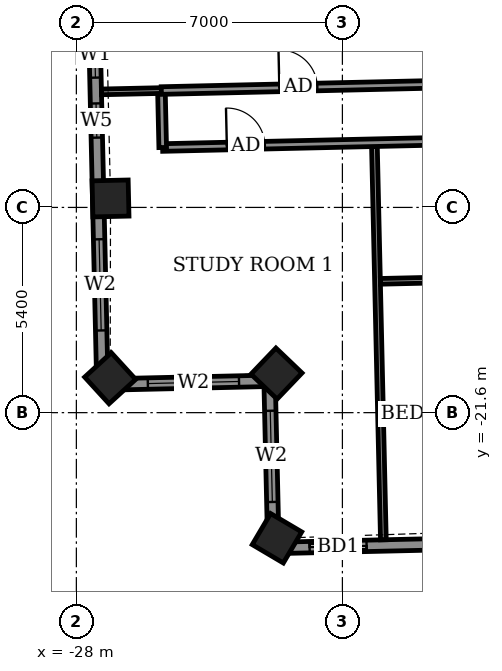
"""IFC4 building model, lengths in metres.
Left out: names, types, materials, properties, quantities, classifications, styles, units other than length and angle.
Written with IfcOpenShell. Run it as: python <this file> out.ifc"""

import sys

from ifc_helpers import new_model, si_unit, direction, frame, frame_2d, origin, origin_2d, place, context, subcontext, project, spatial, rectangle, extrude, element, fill, save


model = new_model("IFC4")
c1 = context("Model", 3, precision=1e-05, world=origin(), true_north=direction((0.0, 1.0)))
c2 = subcontext(c1, "Body", "Model", "MODEL_VIEW")
j1 = project(units=[si_unit("LENGTHUNIT", "METRE"), si_unit("PLANEANGLEUNIT", "RADIAN")], contexts=[c1])
p1 = place(None, origin())
s1 = spatial("IfcSite", under=j1, at=p1, CompositionType="ELEMENT")
p2 = place(p1, origin())
s2 = spatial("IfcBuilding", under=s1, at=p2, CompositionType="ELEMENT")
p3 = place(p2, frame((0.0, 0.0, 290.7)))
s3 = spatial("IfcBuildingStorey", under=s2, at=p3, CompositionType="ELEMENT", Elevation=290.7)
for number, where, z_axis, x_axis in (
    (1, (-27.101, -15.964, -0.55), (0.0, 0.0, 1.0), (0.023, -1.0, 0.0)),
    (2, (-27.11, -20.695, -0.55), (0.0, 0.0, 1.0), (0.675, -0.738, 0.0)),
    (3, (-22.734, -20.572, -0.55), (0.0, 0.0, 1.0), (0.723, -0.691, 0.0)),
    (4, (-22.721, -24.905, -0.55), (0.0, 0.0, 1.0), (0.861, -0.509, 0.0)),
):
    element("IfcColumn", number, at=place(p3, frame(where, z_axis=z_axis, x_axis=x_axis)), inside=s3, PredefinedType="COLUMN", context=c2, shape_type="SweptSolid", body=[
        extrude(rectangle(XDim=0.95, YDim=0.95, at=origin_2d()), origin(), (0.0, 0.0, 1.0), 3.6),
    ])
p4 = place(p3, frame((-27.665, -5.416, 0.0), z_axis=(0.0, 0.0, 1.0), x_axis=(0.022660024814, -0.999743228672, 0.0)))
e5 = element("IfcWall", 5, at=p4, inside=s3, PredefinedType="SOLIDWALL", context=c2, shape_type="SweptSolid", body=[
    extrude(rectangle(XDim=15.45, YDim=0.3, at=frame_2d((7.725, 0.0))), origin(), (0.0, 0.0, 1.0), 2.55),
])
p5 = place(p4, frame((1.975, 0.0, 0.0)))
e6 = element("IfcOpeningElement", 6, at=p5, cuts=e5, PredefinedType="OPENING", context=c2, shape_type="SweptSolid", body=[
    extrude(rectangle(XDim=1.5, YDim=2.4, at=frame_2d((0.75, 1.2))), frame((0.0, 0.16, 0.0), z_axis=(0.0, -1.0, 0.0), x_axis=(1.0, 0.0, 0.0)), (0.0, 0.0, 1.0), 0.32),
])
p6 = place(p4, frame((6.171, 0.0, 0.9)))
e7 = element("IfcOpeningElement", 7, at=p6, cuts=e5, PredefinedType="OPENING", context=c2, shape_type="SweptSolid", body=[
    extrude(rectangle(XDim=1.2, YDim=1.5, at=frame_2d((0.6, 0.75))), frame((0.0, 0.16, 0.0), z_axis=(0.0, -1.0, 0.0), x_axis=(1.0, 0.0, 0.0)), (0.0, 0.0, 1.0), 0.32),
])
p7 = place(p4, frame((8.05, 0.0, 0.9)))
e8 = element("IfcOpeningElement", 8, at=p7, cuts=e5, PredefinedType="OPENING", context=c2, shape_type="SweptSolid", body=[
    extrude(rectangle(XDim=0.9, YDim=1.5, at=frame_2d((0.45, 0.75))), frame((0.0, 0.16, 0.0), z_axis=(0.0, -1.0, 0.0), x_axis=(1.0, 0.0, 0.0)), (0.0, 0.0, 1.0), 0.32),
])
p8 = place(p4, frame((11.625, 0.0, 0.9)))
e9 = element("IfcOpeningElement", 9, at=p8, cuts=e5, PredefinedType="OPENING", context=c2, shape_type="SweptSolid", body=[
    extrude(rectangle(XDim=2.4, YDim=1.5, at=frame_2d((1.2, 0.75))), frame((0.0, 0.16, 0.0), z_axis=(0.0, -1.0, 0.0), x_axis=(1.0, 0.0, 0.0)), (0.0, 0.0, 1.0), 0.32),
])
p9 = place(p3, frame((-27.315, -20.862, 0.0), z_axis=(0.0, 0.0, 1.0), x_axis=(0.999741204967, 0.022749133868, 0.0)))
e10 = element("IfcWall", 10, at=p9, inside=s3, PredefinedType="SOLIDWALL", context=c2, shape_type="SweptSolid", body=[
    extrude(rectangle(XDim=4.4, YDim=0.3, at=frame_2d((2.2, 0.0))), origin(), (0.0, 0.0, 1.0), 2.55),
])
p10 = place(p9, frame((1.196, 0.0, 0.9)))
e11 = element("IfcOpeningElement", 11, at=p10, cuts=e10, PredefinedType="OPENING", context=c2, shape_type="SweptSolid", body=[
    extrude(rectangle(XDim=2.4, YDim=1.5, at=frame_2d((1.2, 0.75))), frame((0.0, 0.16, 0.0), z_axis=(0.0, -1.0, 0.0), x_axis=(1.0, 0.0, 0.0)), (0.0, 0.0, 1.0), 0.32),
])
p11 = place(p3, frame((-22.916, -20.762, 0.0), z_axis=(0.0, 0.0, 1.0), x_axis=(0.022749133868, -0.999741204967, 0.0)))
e12 = element("IfcWall", 12, at=p11, inside=s3, PredefinedType="SOLIDWALL", context=c2, shape_type="SweptSolid", body=[
    extrude(rectangle(XDim=4.4, YDim=0.3, at=frame_2d((2.2, 0.0))), origin(), (0.0, 0.0, 1.0), 2.55),
])
p12 = place(p11, frame((0.789, 0.0, 0.9)))
e13 = element("IfcOpeningElement", 13, at=p12, cuts=e12, PredefinedType="OPENING", context=c2, shape_type="SweptSolid", body=[
    extrude(rectangle(XDim=2.4, YDim=1.5, at=frame_2d((1.2, 0.75))), frame((0.0, 0.16, 0.0), z_axis=(0.0, -1.0, 0.0), x_axis=(1.0, 0.0, 0.0)), (0.0, 0.0, 1.0), 0.32),
])
p13 = place(p3, frame((-22.816, -25.161, 0.0), z_axis=(0.0, 0.0, 1.0), x_axis=(0.999742646411, 0.022685699159, 0.0)))
e14 = element("IfcWall", 14, at=p13, inside=s3, PredefinedType="SOLIDWALL", context=c2, shape_type="SweptSolid", body=[
    extrude(rectangle(XDim=49.236, YDim=0.3, at=frame_2d((24.618, 0.0))), origin(), (0.0, 0.0, 1.0), 2.5),
])
p14 = place(p13, frame((0.953, 0.0, 0.0)))
e15 = element("IfcOpeningElement", 15, at=p14, cuts=e14, PredefinedType="OPENING", context=c2, shape_type="SweptSolid", body=[
    extrude(rectangle(XDim=1.5, YDim=2.4, at=frame_2d((0.75, 1.2))), frame((0.0, 0.16, 0.0), z_axis=(0.0, -1.0, 0.0), x_axis=(1.0, 0.0, 0.0)), (0.0, 0.0, 1.0), 0.32),
])
p15 = place(p13, frame((4.051, 0.0, 0.0)))
e16 = element("IfcOpeningElement", 16, at=p15, cuts=e14, PredefinedType="OPENING", context=c2, shape_type="SweptSolid", body=[
    extrude(rectangle(XDim=1.5, YDim=2.4, at=frame_2d((0.75, 1.2))), frame((0.0, 0.16, 0.0), z_axis=(0.0, -1.0, 0.0), x_axis=(1.0, 0.0, 0.0)), (0.0, 0.0, 1.0), 0.32),
])
p16 = place(p13, frame((8.725, 0.0, 0.0)))
e17 = element("IfcOpeningElement", 17, at=p16, cuts=e14, PredefinedType="OPENING", context=c2, shape_type="SweptSolid", body=[
    extrude(rectangle(XDim=1.5, YDim=2.4, at=frame_2d((0.75, 1.2))), frame((0.0, 0.16, 0.0), z_axis=(0.0, -1.0, 0.0), x_axis=(1.0, 0.0, 0.0)), (0.0, 0.0, 1.0), 0.32),
])
p17 = place(p13, frame((12.139, 0.0, 0.0)))
e18 = element("IfcOpeningElement", 18, at=p17, cuts=e14, PredefinedType="OPENING", context=c2, shape_type="SweptSolid", body=[
    extrude(rectangle(XDim=1.2, YDim=2.4, at=frame_2d((0.6, 1.2))), frame((0.0, 0.16, 0.0), z_axis=(0.0, -1.0, 0.0), x_axis=(1.0, 0.0, 0.0)), (0.0, 0.0, 1.0), 0.32),
])
p18 = place(p13, frame((17.6, 0.0, 0.0)))
e19 = element("IfcOpeningElement", 19, at=p18, cuts=e14, PredefinedType="OPENING", context=c2, shape_type="SweptSolid", body=[
    extrude(rectangle(XDim=1.5, YDim=2.4, at=frame_2d((0.75, 1.2))), frame((0.0, 0.16, 0.0), z_axis=(0.0, -1.0, 0.0), x_axis=(1.0, 0.0, 0.0)), (0.0, 0.0, 1.0), 0.32),
])
p19 = place(p13, frame((22.453, 0.0, 0.0)))
e20 = element("IfcOpeningElement", 20, at=p19, cuts=e14, PredefinedType="OPENING", context=c2, shape_type="SweptSolid", body=[
    extrude(rectangle(XDim=1.5, YDim=2.4, at=frame_2d((0.75, 1.2))), frame((0.0, 0.16, 0.0), z_axis=(0.0, -1.0, 0.0), x_axis=(1.0, 0.0, 0.0)), (0.0, 0.0, 1.0), 0.32),
])
p20 = place(p13, frame((25.765, 0.0, 0.0)))
e21 = element("IfcOpeningElement", 21, at=p20, cuts=e14, PredefinedType="OPENING", context=c2, shape_type="SweptSolid", body=[
    extrude(rectangle(XDim=1.5, YDim=2.4, at=frame_2d((0.75, 1.2))), frame((0.0, 0.16, 0.0), z_axis=(0.0, -1.0, 0.0), x_axis=(1.0, 0.0, 0.0)), (0.0, 0.0, 1.0), 0.32),
])
p21 = place(p13, frame((31.25, 0.0, 0.0)))
e22 = element("IfcOpeningElement", 22, at=p21, cuts=e14, PredefinedType="OPENING", context=c2, shape_type="SweptSolid", body=[
    extrude(rectangle(XDim=1.5, YDim=2.4, at=frame_2d((0.75, 1.2))), frame((0.0, 0.16, 0.0), z_axis=(0.0, -1.0, 0.0), x_axis=(1.0, 0.0, 0.0)), (0.0, 0.0, 1.0), 0.32),
])
p22 = place(p13, frame((36.429, 0.0, 0.0)))
e23 = element("IfcOpeningElement", 23, at=p22, cuts=e14, PredefinedType="OPENING", context=c2, shape_type="SweptSolid", body=[
    extrude(rectangle(XDim=1.5, YDim=2.4, at=frame_2d((0.75, 1.2))), frame((0.0, 0.16, 0.0), z_axis=(0.0, -1.0, 0.0), x_axis=(1.0, 0.0, 0.0)), (0.0, 0.0, 1.0), 0.32),
])
p23 = place(p13, frame((39.742, 0.0, 0.0)))
e24 = element("IfcOpeningElement", 24, at=p23, cuts=e14, PredefinedType="OPENING", context=c2, shape_type="SweptSolid", body=[
    extrude(rectangle(XDim=1.5, YDim=2.4, at=frame_2d((0.75, 1.2))), frame((0.0, 0.16, 0.0), z_axis=(0.0, -1.0, 0.0), x_axis=(1.0, 0.0, 0.0)), (0.0, 0.0, 1.0), 0.32),
])
p24 = place(p13, frame((44.72, 0.0, 0.9)))
e25 = element("IfcOpeningElement", 25, at=p24, cuts=e14, PredefinedType="OPENING", context=c2, shape_type="SweptSolid", body=[
    extrude(rectangle(XDim=2.4, YDim=1.5, at=frame_2d((1.2, 0.75))), frame((0.0, 0.16, 0.0), z_axis=(0.0, -1.0, 0.0), x_axis=(1.0, 0.0, 0.0)), (0.0, 0.0, 1.0), 0.32),
])
p25 = place(p3, frame((-19.922, -24.945, 0.0), z_axis=(0.0, 0.0, 1.0), x_axis=(-0.022692470342, 0.99974249274, 0.0)))
e26 = element("IfcWall", 26, at=p25, inside=s3, PredefinedType="PARTITIONING", context=c2, shape_type="SweptSolid", body=[
    extrude(rectangle(XDim=10.35, YDim=0.15, at=frame_2d((5.175, 0.0))), origin(), (0.0, 0.0, 1.0), 2.55),
])
p26 = place(p3, frame((-19.999, -18.145, 0.0), z_axis=(0.0, 0.0, 1.0), x_axis=(0.999740260747, 0.02279059109, 0.0)))
e27 = element("IfcWall", 27, at=p26, inside=s3, PredefinedType="PARTITIONING", context=c2, shape_type="SweptSolid", body=[
    extrude(rectangle(XDim=2.324, YDim=0.15, at=frame_2d((1.162, 0.0))), origin(), (0.0, 0.0, 1.0), 3.05),
])
p27 = place(p3, frame((-25.731, -14.624, 0.0), z_axis=(0.0, 0.0, 1.0), x_axis=(0.999742799525, 0.022678950563, 0.0)))
e28 = element("IfcWall", 28, at=p27, inside=s3, PredefinedType="PARTITIONING", context=c2, shape_type="SweptSolid", body=[
    extrude(rectangle(XDim=55.386, YDim=0.2, at=frame_2d((27.693, 0.0))), origin(), (0.0, 0.0, 1.0), 3.05),
])
p28 = place(p27, frame((1.691, 0.0, 0.0)))
e29 = element("IfcOpeningElement", 29, at=p28, cuts=e28, PredefinedType="OPENING", context=c2, shape_type="SweptSolid", body=[
    extrude(rectangle(XDim=1.0, YDim=2.1, at=frame_2d((0.5, 1.05))), frame((0.0, 0.11, 0.0), z_axis=(0.0, -1.0, 0.0), x_axis=(1.0, 0.0, 0.0)), (0.0, 0.0, 1.0), 0.22),
])
p29 = place(p27, frame((8.5, 0.0, 0.0)))
e30 = element("IfcOpeningElement", 30, at=p29, cuts=e28, PredefinedType="OPENING", context=c2, shape_type="SweptSolid", body=[
    extrude(rectangle(XDim=0.9, YDim=2.1, at=frame_2d((0.45, 1.05))), frame((0.0, 0.11, 0.0), z_axis=(0.0, -1.0, 0.0), x_axis=(1.0, 0.0, 0.0)), (0.0, 0.0, 1.0), 0.22),
])
p30 = place(p27, frame((10.5, 0.0, 0.0)))
e31 = element("IfcOpeningElement", 31, at=p30, cuts=e28, PredefinedType="OPENING", context=c2, shape_type="SweptSolid", body=[
    extrude(rectangle(XDim=0.9, YDim=2.1, at=frame_2d((0.45, 1.05))), frame((0.0, 0.11, 0.0), z_axis=(0.0, -1.0, 0.0), x_axis=(1.0, 0.0, 0.0)), (0.0, 0.0, 1.0), 0.22),
])
p31 = place(p27, frame((17.325, 0.0, 0.0)))
e32 = element("IfcOpeningElement", 32, at=p31, cuts=e28, PredefinedType="OPENING", context=c2, shape_type="SweptSolid", body=[
    extrude(rectangle(XDim=0.9, YDim=2.1, at=frame_2d((0.45, 1.05))), frame((0.0, 0.11, 0.0), z_axis=(0.0, -1.0, 0.0), x_axis=(1.0, 0.0, 0.0)), (0.0, 0.0, 1.0), 0.22),
])
p32 = place(p27, frame((19.375, 0.0, 0.0)))
e33 = element("IfcOpeningElement", 33, at=p32, cuts=e28, PredefinedType="OPENING", context=c2, shape_type="SweptSolid", body=[
    extrude(rectangle(XDim=0.9, YDim=2.1, at=frame_2d((0.45, 1.05))), frame((0.0, 0.11, 0.0), z_axis=(0.0, -1.0, 0.0), x_axis=(1.0, 0.0, 0.0)), (0.0, 0.0, 1.0), 0.22),
])
p33 = place(p27, frame((26.275, 0.0, 0.0)))
e34 = element("IfcOpeningElement", 34, at=p33, cuts=e28, PredefinedType="OPENING", context=c2, shape_type="SweptSolid", body=[
    extrude(rectangle(XDim=0.9, YDim=2.1, at=frame_2d((0.45, 1.05))), frame((0.0, 0.11, 0.0), z_axis=(0.0, -1.0, 0.0), x_axis=(1.0, 0.0, 0.0)), (0.0, 0.0, 1.0), 0.22),
])
p34 = place(p27, frame((28.425, 0.0, 0.0)))
e35 = element("IfcOpeningElement", 35, at=p34, cuts=e28, PredefinedType="OPENING", context=c2, shape_type="SweptSolid", body=[
    extrude(rectangle(XDim=0.9, YDim=2.1, at=frame_2d((0.45, 1.05))), frame((0.0, 0.11, 0.0), z_axis=(0.0, -1.0, 0.0), x_axis=(1.0, 0.0, 0.0)), (0.0, 0.0, 1.0), 0.22),
])
p35 = place(p27, frame((35.425, 0.0, 0.0)))
e36 = element("IfcOpeningElement", 36, at=p35, cuts=e28, PredefinedType="OPENING", context=c2, shape_type="SweptSolid", body=[
    extrude(rectangle(XDim=0.9, YDim=2.1, at=frame_2d((0.45, 1.05))), frame((0.0, 0.11, 0.0), z_axis=(0.0, -1.0, 0.0), x_axis=(1.0, 0.0, 0.0)), (0.0, 0.0, 1.0), 0.22),
])
p36 = place(p27, frame((37.625, 0.0, 0.0)))
e37 = element("IfcOpeningElement", 37, at=p36, cuts=e28, PredefinedType="OPENING", context=c2, shape_type="SweptSolid", body=[
    extrude(rectangle(XDim=0.9, YDim=2.1, at=frame_2d((0.45, 1.05))), frame((0.0, 0.11, 0.0), z_axis=(0.0, -1.0, 0.0), x_axis=(1.0, 0.0, 0.0)), (0.0, 0.0, 1.0), 0.22),
])
p37 = place(p27, frame((44.475, 0.0, 0.0)))
e38 = element("IfcOpeningElement", 38, at=p37, cuts=e28, PredefinedType="OPENING", context=c2, shape_type="SweptSolid", body=[
    extrude(rectangle(XDim=0.9, YDim=2.1, at=frame_2d((0.45, 1.05))), frame((0.0, 0.11, 0.0), z_axis=(0.0, -1.0, 0.0), x_axis=(1.0, 0.0, 0.0)), (0.0, 0.0, 1.0), 0.22),
])
p38 = place(p27, frame((52.268, 0.0, 0.0)))
e39 = element("IfcOpeningElement", 39, at=p38, cuts=e28, PredefinedType="OPENING", context=c2, shape_type="SweptSolid", body=[
    extrude(rectangle(XDim=1.0, YDim=2.1, at=frame_2d((0.5, 1.05))), frame((0.0, 0.11, 0.0), z_axis=(0.0, -1.0, 0.0), x_axis=(1.0, 0.0, 0.0)), (0.0, 0.0, 1.0), 0.22),
])
p39 = place(p27, frame((46.625, 0.0, 0.0)))
e40 = element("IfcOpeningElement", 40, at=p39, cuts=e28, PredefinedType="OPENING", context=c2, shape_type="SweptSolid", body=[
    extrude(rectangle(XDim=0.9, YDim=2.1, at=frame_2d((0.45, 1.05))), frame((0.0, 0.11, 0.0), z_axis=(0.0, -1.0, 0.0), x_axis=(1.0, 0.0, 0.0)), (0.0, 0.0, 1.0), 0.22),
])
p40 = place(p3, frame((-25.728, -14.624, 0.0), z_axis=(0.0, 0.0, 1.0), x_axis=(-0.022632637625, 0.99974384905, 0.0)))
e41 = element("IfcWall", 41, at=p40, inside=s3, PredefinedType="PARTITIONING", context=c2, shape_type="SweptSolid", body=[
    extrude(rectangle(XDim=1.5, YDim=0.2, at=frame_2d((0.75, 0.0))), origin(), (0.0, 0.0, 1.0), 3.05),
])
p41 = place(p3, frame((-27.339, -13.16, 0.0), z_axis=(0.0, 0.0, 1.0), x_axis=(0.999755386732, 0.022117113289, 0.0)))
e42 = element("IfcWall", 42, at=p41, inside=s3, PredefinedType="PARTITIONING", context=c2, shape_type="SweptSolid", body=[
    extrude(rectangle(XDim=1.579, YDim=0.15, at=frame_2d((0.789, 0.0))), origin(), (0.0, 0.0, 1.0), 2.55),
])
p42 = place(p3, frame((-25.765, -13.125, 0.0), z_axis=(0.0, 0.0, 1.0), x_axis=(0.999740502457, 0.022779985654, 0.0)))
e43 = element("IfcWall", 43, at=p42, inside=s3, PredefinedType="PARTITIONING", context=c2, shape_type="SweptSolid", body=[
    extrude(rectangle(XDim=9.088, YDim=0.2, at=frame_2d((4.544, 0.0))), origin(), (0.0, 0.0, 1.0), 3.05),
])
p43 = place(p42, frame((3.107, 0.0, 0.0)))
e44 = element("IfcOpeningElement", 44, at=p43, cuts=e43, PredefinedType="OPENING", context=c2, shape_type="SweptSolid", body=[
    extrude(rectangle(XDim=1.0, YDim=2.1, at=frame_2d((0.5, 1.05))), frame((0.0, 0.11, 0.0), z_axis=(0.0, -1.0, 0.0), x_axis=(1.0, 0.0, 0.0)), (0.0, 0.0, 1.0), 0.22),
])
p44 = place(p6, origin())
e45 = element("IfcWindow", 45, at=p44, inside=s3, PartitioningType="SINGLE_PANEL", PredefinedType="WINDOW", context=c2, shape_type="SweptSolid", body=[
    extrude(rectangle(XDim=1.2, YDim=1.5, at=frame_2d((0.6, 0.75))), frame((0.0, 0.03, 0.0), z_axis=(0.0, -1.0, 0.0), x_axis=(1.0, 0.0, 0.0)), (0.0, 0.0, 1.0), 0.06),
])
fill(e7, e45)
p45 = place(p7, origin())
e46 = element("IfcWindow", 46, at=p45, inside=s3, PartitioningType="SINGLE_PANEL", PredefinedType="WINDOW", context=c2, shape_type="SweptSolid", body=[
    extrude(rectangle(XDim=0.9, YDim=1.5, at=frame_2d((0.45, 0.75))), frame((0.0, 0.03, 0.0), z_axis=(0.0, -1.0, 0.0), x_axis=(1.0, 0.0, 0.0)), (0.0, 0.0, 1.0), 0.06),
])
fill(e8, e46)
p46 = place(p8, origin())
e47 = element("IfcWindow", 47, at=p46, inside=s3, PartitioningType="DOUBLE_PANEL_VERTICAL", PredefinedType="WINDOW", context=c2, shape_type="SweptSolid", body=[
    extrude(rectangle(XDim=2.4, YDim=1.5, at=frame_2d((1.2, 0.75))), frame((0.0, 0.03, 0.0), z_axis=(0.0, -1.0, 0.0), x_axis=(1.0, 0.0, 0.0)), (0.0, 0.0, 1.0), 0.06),
])
fill(e9, e47)
p47 = place(p10, origin())
e48 = element("IfcWindow", 48, at=p47, inside=s3, PartitioningType="DOUBLE_PANEL_VERTICAL", PredefinedType="WINDOW", context=c2, shape_type="SweptSolid", body=[
    extrude(rectangle(XDim=2.4, YDim=1.5, at=frame_2d((1.2, 0.75))), frame((0.0, 0.03, 0.0), z_axis=(0.0, -1.0, 0.0), x_axis=(1.0, 0.0, 0.0)), (0.0, 0.0, 1.0), 0.06),
])
fill(e11, e48)
p48 = place(p12, origin())
e49 = element("IfcWindow", 49, at=p48, inside=s3, PartitioningType="DOUBLE_PANEL_VERTICAL", PredefinedType="WINDOW", context=c2, shape_type="SweptSolid", body=[
    extrude(rectangle(XDim=2.4, YDim=1.5, at=frame_2d((1.2, 0.75))), frame((0.0, 0.03, 0.0), z_axis=(0.0, -1.0, 0.0), x_axis=(1.0, 0.0, 0.0)), (0.0, 0.0, 1.0), 0.06),
])
fill(e13, e49)
p49 = place(p14, origin())
e50 = element("IfcDoor", 50, at=p49, inside=s3, OperationType="SLIDING_TO_LEFT", PredefinedType="DOOR", context=c2, shape_type="SweptSolid", body=[
    extrude(rectangle(XDim=1.5, YDim=2.4, at=frame_2d((0.75, 1.2))), frame((0.0, 0.025, 0.0), z_axis=(0.0, -1.0, 0.0), x_axis=(1.0, 0.0, 0.0)), (0.0, 0.0, 1.0), 0.05),
])
fill(e15, e50)
p50 = place(p28, origin())
e51 = element("IfcDoor", 51, at=p50, inside=s3, OperationType="SINGLE_SWING_LEFT", PredefinedType="DOOR", context=c2, shape_type="SweptSolid", body=[
    extrude(rectangle(XDim=1.0, YDim=2.1, at=frame_2d((0.5, 1.05))), frame((0.0, 0.025, 0.0), z_axis=(0.0, -1.0, 0.0), x_axis=(1.0, 0.0, 0.0)), (0.0, 0.0, 1.0), 0.05),
])
fill(e29, e51)
p51 = place(p43, origin())
e52 = element("IfcDoor", 52, at=p51, inside=s3, OperationType="SINGLE_SWING_RIGHT", PredefinedType="DOOR", context=c2, shape_type="SweptSolid", body=[
    extrude(rectangle(XDim=1.0, YDim=2.1, at=frame_2d((0.5, 1.05))), frame((0.0, 0.025, 0.0), z_axis=(0.0, -1.0, 0.0), x_axis=(1.0, 0.0, 0.0)), (0.0, 0.0, 1.0), 0.05),
])
fill(e44, e52)
save(model, sys.argv[1])
